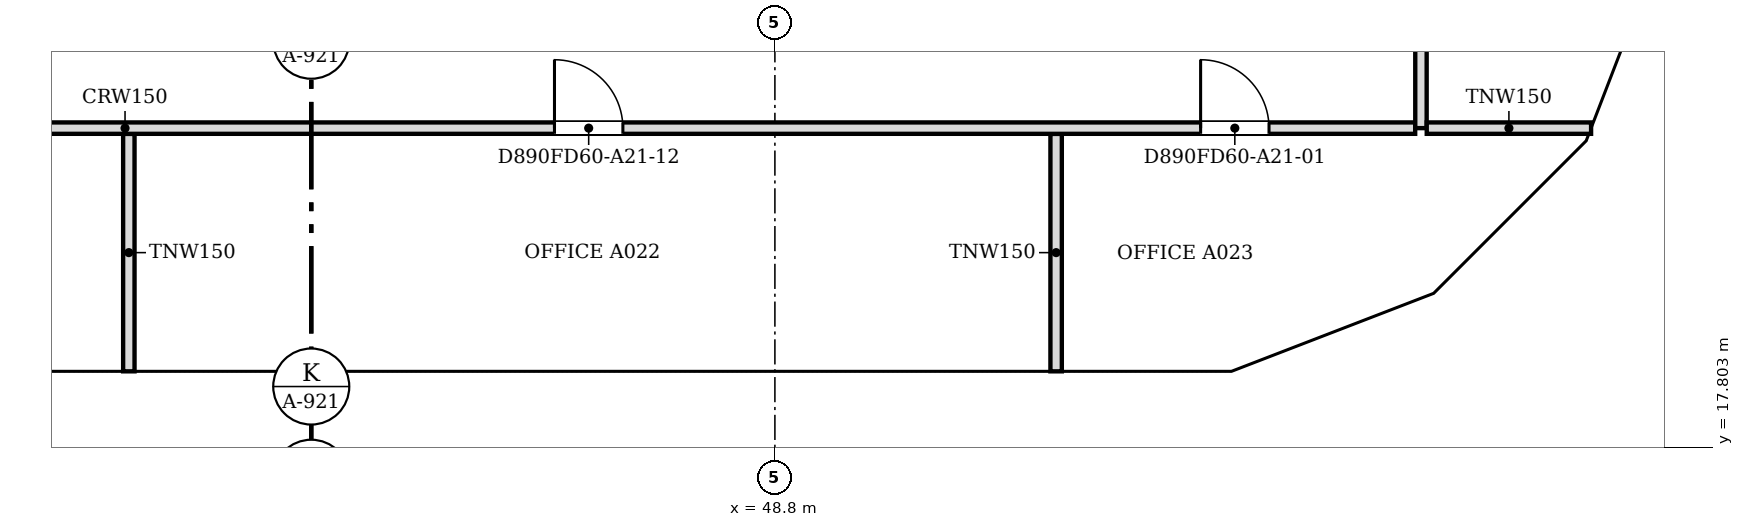
"""IFC4 building model, lengths in metres.
Left out: names, types, materials, properties, quantities, classifications, styles, units other than length and angle.
Written with IfcOpenShell. Run it as: python <this file> out.ifc"""

import sys

from ifc_helpers import new_model, si_unit, direction, frame, frame_2d, origin, place, context, subcontext, project, spatial, polyline, rectangle, outline, extrude, faceted_brep, source, transform, mapped, element, fill, save


model = new_model("IFC4")
c1 = context("Model", 3, precision=1e-05, world=origin(), true_north=direction((0.0, 1.0)))
c2 = subcontext(c1, "Body", "Model", "MODEL_VIEW")
j1 = project(units=[si_unit("LENGTHUNIT", "METRE"), si_unit("PLANEANGLEUNIT", "RADIAN")], contexts=[c1])
p1 = place(None, origin())
s1 = spatial("IfcSite", under=j1, at=p1, CompositionType="ELEMENT")
p2 = place(p1, origin())
s2 = spatial("IfcBuilding", under=s1, at=p2, CompositionType="ELEMENT")
p3 = place(p2, frame((0.0, 0.0, 248.3)))
s3 = spatial("IfcBuildingStorey", under=s2, at=p3, CompositionType="ELEMENT", Elevation=248.3)
m1 = source(origin(), c2, "Body", "Brep", [
    faceted_brep([(3.05, -0.25, 0.0), (6.1, -0.25, 3.8), (6.1, -0.25, 3.8), (3.05, -0.25, 7.6), (0.0, -0.25, 3.8), (0.0, 0.25, 3.8), (3.05, 0.25, 7.6), (6.1, 0.25, 3.8), (6.1, 0.25, 3.8), (3.05, 0.25, 0.0)], [[[0, 1, 2, 3, 4]], [[5, 6, 7, 8, 9]], [[9, 8, 1, 0]], [[7, 6, 3, 2]], [[6, 5, 4, 3]], [[5, 9, 0, 4]], [[1, 8, 7, 2]]]),
])
p4 = place(p3, frame((36.6, 18.55, -3.8), z_axis=(0.0, 0.0, 1.0), x_axis=(1.0, 0.0, 0.0)))
e1 = element("IfcWall", 1, at=p4, inside=s3, PredefinedType="SOLIDWALL", context=c2, shape_type="MappedRepresentation", body=[
    mapped(m1, transform((0.0, 0.0, 0.0), scale=1.0)),
])
m2 = source(origin(), c2, "Body", "SweptSolid", [
    extrude(outline(polyline([(3.05, 0.399), (5.78, 3.8), (3.05, 7.201), (0.321, 3.8), (3.05, 0.399)])), frame((0.0, 0.26, 0.0), z_axis=(0.0, -1.0, 0.0), x_axis=(1.0, 0.0, 0.0)), (0.0, 0.0, 1.0), 0.52),
])
p5 = place(p4, origin())
e2 = element("IfcOpeningElement", 2, at=p5, cuts=e1, PredefinedType="OPENING", context=c2, shape_type="MappedRepresentation", body=[
    mapped(m2, transform((0.0, 0.0, 0.0), scale=1.0)),
])
m3 = source(origin(), c2, "Body", "SweptSolid", [
    extrude(outline(polyline([(3.05, 0.0), (6.1, 3.8), (3.05, 7.6), (0.0, 3.8), (3.05, 0.0)])), frame((0.0, 0.25, 0.0), z_axis=(0.0, -1.0, 0.0), x_axis=(1.0, 0.0, 0.0)), (0.0, 0.0, 1.0), 0.5),
])
p6 = place(p3, frame((42.7, 18.55, -3.8), z_axis=(0.0, 0.0, 1.0), x_axis=(1.0, 0.0, 0.0)))
e3 = element("IfcWall", 3, at=p6, inside=s3, PredefinedType="SOLIDWALL", context=c2, shape_type="MappedRepresentation", body=[
    mapped(m3, transform((0.0, 0.0, 0.0), scale=1.0)),
])
p7 = place(p6, origin())
e4 = element("IfcOpeningElement", 4, at=p7, cuts=e3, PredefinedType="OPENING", context=c2, shape_type="MappedRepresentation", body=[
    mapped(m2, transform((0.0, 0.0, 0.0), scale=1.0)),
])
m4 = source(origin(), c2, "Body", "Brep", [
    faceted_brep([(3.05, -0.25, 0.0), (6.053, -0.25, 3.8), (3.05, -0.25, 7.6), (0.0, -0.25, 3.8), (0.0, 0.25, 3.8), (3.05, 0.25, 7.6), (6.007, 0.25, 3.859), (6.007, 0.25, 3.741), (3.05, 0.25, 0.0), (6.053, 0.0, 3.8)], [[[0, 1, 2, 3]], [[4, 5, 6, 7, 8]], [[8, 7, 9, 1, 0]], [[6, 5, 2, 1, 9]], [[5, 4, 3, 2]], [[4, 8, 0, 3]], [[9, 7, 6]]]),
])
p8 = place(p3, frame((48.8, 18.55, -3.8), z_axis=(0.0, 0.0, 1.0), x_axis=(1.0, 0.0, 0.0)))
e5 = element("IfcWall", 5, at=p8, inside=s3, PredefinedType="SOLIDWALL", context=c2, shape_type="MappedRepresentation", body=[
    mapped(m4, transform((0.0, 0.0, 0.0), scale=1.0)),
])
m5 = source(origin(), c2, "Body", "SweptSolid", [
    extrude(outline(polyline([(3.049, 0.401), (5.735, 3.8), (3.049, 7.199), (0.321, 3.8), (3.049, 0.401)])), frame((0.0, 0.26, 0.0), z_axis=(0.0, -1.0, 0.0), x_axis=(1.0, 0.0, 0.0)), (0.0, 0.0, 1.0), 0.52),
])
p9 = place(p8, origin())
e6 = element("IfcOpeningElement", 6, at=p9, cuts=e5, PredefinedType="OPENING", context=c2, shape_type="MappedRepresentation", body=[
    mapped(m5, transform((0.0, 0.0, 0.0), scale=1.0)),
])
m6 = source(origin(), c2, "Body", "Brep", [
    faceted_brep([(2.95, -0.25, 0.0), (3.003, -0.25, 0.068), (3.003, -0.25, 7.532), (2.95, -0.25, 7.6), (0.0, -0.25, 3.8), (0.047, 0.25, 3.86), (2.898, 0.25, 7.532), (2.898, 0.25, 0.068), (0.047, 0.25, 3.74), (2.95, 0.0, 0.0), (2.95, 0.0, 7.6), (0.0, 0.0, 3.8)], [[[0, 1, 2, 3, 4]], [[5, 6, 7, 8]], [[1, 0, 9]], [[10, 3, 2]], [[6, 5, 11, 4, 3, 10]], [[8, 7, 9, 0, 4, 11]], [[8, 11, 5]], [[1, 9, 7, 6, 10, 2]]]),
])
p10 = place(p3, frame((54.854, 18.55, -3.8), z_axis=(0.0, 0.0, 1.0), x_axis=(0.932997369089, 0.359883188373, 0.0)))
e7 = element("IfcWall", 7, at=p10, inside=s3, PredefinedType="SOLIDWALL", context=c2, shape_type="MappedRepresentation", body=[
    mapped(m6, transform((0.0, 0.0, 0.0), scale=1.0)),
])
m7 = source(origin(), c2, "Body", "SweptSolid", [
    extrude(outline(polyline([(2.75, 6.935), (0.316, 3.8), (2.75, 0.665), (2.75, 6.935)])), frame((0.0, 0.26, 0.0), z_axis=(0.0, -1.0, 0.0), x_axis=(1.0, 0.0, 0.0)), (0.0, 0.0, 1.0), 0.52),
])
p11 = place(p10, origin())
e8 = element("IfcOpeningElement", 8, at=p11, cuts=e7, PredefinedType="OPENING", context=c2, shape_type="MappedRepresentation", body=[
    mapped(m7, transform((0.0, 0.0, 0.0), scale=1.0)),
])
m8 = source(origin(), c2, "Body", "Brep", [
    faceted_brep([(0.053, -0.25, 0.0), (2.997, -0.25, 3.8), (0.053, -0.25, 7.6), (0.0, -0.25, 7.532), (0.0, -0.25, 0.068), (0.106, 0.25, 7.532), (2.944, 0.25, 3.868), (2.944, 0.25, 3.732), (0.106, 0.25, 0.068), (2.997, 0.0, 3.8), (0.053, 0.0, 0.0), (0.053, 0.0, 7.6)], [[[0, 1, 2, 3, 4]], [[5, 6, 7, 8]], [[8, 7, 9, 1, 0, 10]], [[6, 5, 11, 2, 1, 9]], [[3, 2, 11]], [[10, 0, 4]], [[8, 10, 4, 3, 11, 5]], [[9, 7, 6]]]),
])
p12 = place(p3, frame((57.569, 19.574, -3.8), z_axis=(0.0, 0.0, 1.0), x_axis=(0.707106781187, 0.707106781187, 0.0)))
e9 = element("IfcWall", 9, at=p12, inside=s3, PredefinedType="SOLIDWALL", context=c2, shape_type="MappedRepresentation", body=[
    mapped(m8, transform((0.0, 0.0, 0.0), scale=1.0)),
])
m9 = source(origin(), c2, "Body", "SweptSolid", [
    extrude(outline(polyline([(0.253, 0.666), (2.681, 3.8), (0.253, 6.934), (0.253, 0.666)])), frame((0.0, 0.26, 0.0), z_axis=(0.0, -1.0, 0.0), x_axis=(1.0, 0.0, 0.0)), (0.0, 0.0, 1.0), 0.52),
])
p13 = place(p12, origin())
e10 = element("IfcOpeningElement", 10, at=p13, cuts=e9, PredefinedType="OPENING", context=c2, shape_type="MappedRepresentation", body=[
    mapped(m9, transform((0.0, 0.0, 0.0), scale=1.0)),
])
m10 = source(origin(), c2, "Body", "Brep", [
    faceted_brep([(2.95, -0.25, 0.0), (2.997, -0.25, 0.059), (2.997, -0.25, 7.541), (2.95, -0.25, 7.6), (0.0, -0.25, 3.8), (0.053, 0.25, 3.868), (2.904, 0.25, 7.54), (2.904, 0.25, 0.06), (0.053, 0.25, 3.732), (2.95, 0.0, 0.0), (2.95, 0.0, 7.6), (0.0, 0.0, 3.8)], [[[0, 1, 2, 3, 4]], [[5, 6, 7, 8]], [[1, 0, 9]], [[10, 3, 2]], [[6, 5, 11, 4, 3, 10]], [[8, 7, 9, 0, 4, 11]], [[8, 11, 5]], [[1, 9, 7, 6, 10, 2]]]),
])
p14 = place(p3, frame((59.688, 21.694, -3.8), z_axis=(0.0, 0.0, 1.0), x_axis=(0.359972353723, 0.932962970624, 0.0)))
e11 = element("IfcWall", 11, at=p14, inside=s3, PredefinedType="SOLIDWALL", context=c2, shape_type="MappedRepresentation", body=[
    mapped(m10, transform((0.0, 0.0, 0.0), scale=1.0)),
])
p15 = place(p14, origin())
e12 = element("IfcOpeningElement", 12, at=p15, cuts=e11, PredefinedType="OPENING", context=c2, shape_type="MappedRepresentation", body=[
    mapped(m7, transform((0.0, 0.0, 0.0), scale=1.0)),
])
p16 = place(p2, frame((0.0, 0.0, 252.1)))
s4 = spatial("IfcBuildingStorey", under=s2, at=p16, CompositionType="ELEMENT", Elevation=252.1)
m11 = source(origin(), c2, "Body", "Brep", [
    faceted_brep([(3.05, -0.25, 0.0), (6.1, -0.25, 3.8), (6.1, -0.25, 3.8), (3.05, -0.25, 7.6), (0.0, -0.25, 3.8), (0.0, 0.25, 3.8), (3.05, 0.25, 7.6), (6.1, 0.25, 3.8), (6.1, 0.25, 3.8), (3.05, 0.25, 0.0)], [[[0, 1, 2, 3, 4]], [[5, 6, 7, 8, 9]], [[9, 8, 1, 0]], [[7, 6, 3, 2]], [[6, 5, 4, 3]], [[5, 9, 0, 4]], [[1, 8, 7, 2]]]),
])
p17 = place(p16, frame((33.55, 18.55, -3.8), z_axis=(0.0, 0.0, 1.0), x_axis=(1.0, 0.0, 0.0)))
e13 = element("IfcWall", 13, at=p17, inside=s4, PredefinedType="SOLIDWALL", context=c2, shape_type="MappedRepresentation", body=[
    mapped(m11, transform((0.0, 0.0, 0.0), scale=1.0)),
])
m12 = source(origin(), c2, "Body", "SweptSolid", [
    extrude(outline(polyline([(3.05, 0.399), (5.78, 3.8), (3.05, 7.2), (0.321, 3.8), (3.05, 0.399)])), frame((0.0, 0.26, 0.0), z_axis=(0.0, -1.0, 0.0), x_axis=(1.0, 0.0, 0.0)), (0.0, 0.0, 1.0), 0.52),
])
p18 = place(p17, origin())
e14 = element("IfcOpeningElement", 14, at=p18, cuts=e13, PredefinedType="OPENING", context=c2, shape_type="MappedRepresentation", body=[
    mapped(m12, transform((0.0, 0.0, 0.0), scale=1.0)),
])
m13 = source(origin(), c2, "Body", "SweptSolid", [
    extrude(outline(polyline([(3.05, 0.0), (6.1, 3.8), (3.05, 7.6), (0.0, 3.8), (3.05, 0.0)])), frame((0.0, 0.25, 0.0), z_axis=(0.0, -1.0, 0.0), x_axis=(1.0, 0.0, 0.0)), (0.0, 0.0, 1.0), 0.5),
])
p19 = place(p16, frame((39.65, 18.55, -3.8), z_axis=(0.0, 0.0, 1.0), x_axis=(1.0, 0.0, 0.0)))
e15 = element("IfcWall", 15, at=p19, inside=s4, PredefinedType="SOLIDWALL", context=c2, shape_type="MappedRepresentation", body=[
    mapped(m13, transform((0.0, 0.0, 0.0), scale=1.0)),
])
p20 = place(p19, origin())
e16 = element("IfcOpeningElement", 16, at=p20, cuts=e15, PredefinedType="OPENING", context=c2, shape_type="MappedRepresentation", body=[
    mapped(m12, transform((0.0, 0.0, 0.0), scale=1.0)),
])
p21 = place(p16, frame((45.75, 18.55, -3.8), z_axis=(0.0, 0.0, 1.0), x_axis=(1.0, 0.0, 0.0)))
e17 = element("IfcWall", 17, at=p21, inside=s4, PredefinedType="SOLIDWALL", context=c2, shape_type="MappedRepresentation", body=[
    mapped(m13, transform((0.0, 0.0, 0.0), scale=1.0)),
])
p22 = place(p21, origin())
e18 = element("IfcOpeningElement", 18, at=p22, cuts=e17, PredefinedType="OPENING", context=c2, shape_type="MappedRepresentation", body=[
    mapped(m12, transform((0.0, 0.0, 0.0), scale=1.0)),
])
m14 = source(origin(), c2, "Body", "Brep", [
    faceted_brep([(3.003, -0.25, 0.0), (3.05, -0.25, 0.06), (3.05, -0.25, 7.54), (3.003, -0.25, 7.6), (0.0, -0.25, 3.8), (0.0, 0.25, 3.8), (2.957, 0.25, 7.541), (2.957, 0.25, 0.059), (3.003, 0.0, 0.0), (3.003, 0.0, 7.6)], [[[0, 1, 2, 3, 4]], [[5, 6, 7]], [[1, 0, 8]], [[9, 3, 2]], [[6, 5, 4, 3, 9]], [[5, 7, 8, 0, 4]], [[1, 8, 7, 6, 9, 2]]]),
])
p23 = place(p16, frame((51.85, 18.55, -3.8), z_axis=(0.0, 0.0, 1.0), x_axis=(1.0, 0.0, 0.0)))
e19 = element("IfcWall", 19, at=p23, inside=s4, PredefinedType="SOLIDWALL", context=c2, shape_type="MappedRepresentation", body=[
    mapped(m14, transform((0.0, 0.0, 0.0), scale=1.0)),
])
m15 = source(origin(), c2, "Body", "SweptSolid", [
    extrude(outline(polyline([(2.803, 6.944), (0.319, 3.8), (2.803, 0.656), (2.803, 6.944)])), frame((0.0, 0.26, 0.0), z_axis=(0.0, -1.0, 0.0), x_axis=(1.0, 0.0, 0.0)), (0.0, 0.0, 1.0), 0.52),
])
p24 = place(p23, origin())
e20 = element("IfcOpeningElement", 20, at=p24, cuts=e19, PredefinedType="OPENING", context=c2, shape_type="MappedRepresentation", body=[
    mapped(m15, transform((0.0, 0.0, 0.0), scale=1.0)),
])
m16 = source(origin(), c2, "Body", "Brep", [
    faceted_brep([(0.047, -0.25, 0.0), (2.997, -0.25, 3.8), (0.047, -0.25, 7.6), (0.0, -0.25, 7.541), (0.0, -0.25, 0.059), (0.093, 0.25, 7.54), (2.944, 0.25, 3.868), (2.944, 0.25, 3.732), (0.093, 0.25, 0.06), (2.997, 0.0, 3.8), (0.047, 0.0, 0.0), (0.047, 0.0, 7.6)], [[[0, 1, 2, 3, 4]], [[5, 6, 7, 8]], [[8, 7, 9, 1, 0, 10]], [[6, 5, 11, 2, 1, 9]], [[3, 2, 11]], [[10, 0, 4]], [[8, 10, 4, 3, 11, 5]], [[7, 6, 9]]]),
])
p25 = place(p16, frame((54.81, 18.533, -3.8), z_axis=(0.0, 0.0, 1.0), x_axis=(0.932990326376, 0.359901446078, 0.0)))
e21 = element("IfcWall", 21, at=p25, inside=s4, PredefinedType="SOLIDWALL", context=c2, shape_type="MappedRepresentation", body=[
    mapped(m16, transform((0.0, 0.0, 0.0), scale=1.0)),
])
m17 = source(origin(), c2, "Body", "SweptSolid", [
    extrude(outline(polyline([(0.247, 0.665), (2.681, 3.8), (0.247, 6.935), (0.247, 0.665)])), frame((0.0, 0.26, 0.0), z_axis=(0.0, -1.0, 0.0), x_axis=(1.0, 0.0, 0.0)), (0.0, 0.0, 1.0), 0.52),
])
p26 = place(p25, origin())
e22 = element("IfcOpeningElement", 22, at=p26, cuts=e21, PredefinedType="OPENING", context=c2, shape_type="MappedRepresentation", body=[
    mapped(m17, transform((0.0, 0.0, 0.0), scale=1.0)),
])
m18 = source(origin(), c2, "Body", "Brep", [
    faceted_brep([(2.944, -0.25, 0.0), (2.997, -0.25, 0.068), (2.997, -0.25, 7.532), (2.944, -0.25, 7.6), (0.0, -0.25, 3.8), (0.053, 0.25, 3.868), (2.891, 0.25, 7.532), (2.891, 0.25, 0.068), (0.053, 0.25, 3.732), (2.944, 0.0, 0.0), (2.944, 0.0, 7.6), (0.0, 0.0, 3.8)], [[[0, 1, 2, 3, 4]], [[5, 6, 7, 8]], [[1, 0, 9]], [[10, 3, 2]], [[6, 5, 11, 4, 3, 10]], [[8, 7, 9, 0, 4, 11]], [[8, 11, 5]], [[1, 9, 7, 6, 10, 2]]]),
])
p27 = place(p16, frame((57.606, 19.612, -3.8), z_axis=(0.0, 0.0, 1.0), x_axis=(0.707106781187, 0.707106781187, 0.0)))
e23 = element("IfcWall", 23, at=p27, inside=s4, PredefinedType="SOLIDWALL", context=c2, shape_type="MappedRepresentation", body=[
    mapped(m18, transform((0.0, 0.0, 0.0), scale=1.0)),
])
m19 = source(origin(), c2, "Body", "SweptSolid", [
    extrude(outline(polyline([(2.744, 6.934), (0.316, 3.8), (2.744, 0.666), (2.744, 6.934)])), frame((0.0, 0.26, 0.0), z_axis=(0.0, -1.0, 0.0), x_axis=(1.0, 0.0, 0.0)), (0.0, 0.0, 1.0), 0.52),
])
p28 = place(p27, origin())
e24 = element("IfcOpeningElement", 24, at=p28, cuts=e23, PredefinedType="OPENING", context=c2, shape_type="MappedRepresentation", body=[
    mapped(m19, transform((0.0, 0.0, 0.0), scale=1.0)),
])
m20 = source(origin(), c2, "Body", "Brep", [
    faceted_brep([(0.053, -0.25, 0.0), (3.003, -0.25, 3.8), (0.053, -0.25, 7.6), (0.0, -0.25, 7.531), (0.0, -0.25, 0.068), (0.106, 0.25, 7.532), (2.957, 0.25, 3.86), (2.957, 0.25, 3.74), (0.106, 0.25, 0.068), (3.003, 0.0, 3.8), (0.053, 0.0, 0.0), (0.053, 0.0, 7.6)], [[[0, 1, 2, 3, 4]], [[5, 6, 7, 8]], [[8, 7, 9, 1, 0, 10]], [[6, 5, 11, 2, 1, 9]], [[3, 2, 11]], [[10, 0, 4]], [[8, 10, 4, 3, 11, 5]], [[7, 6, 9]]]),
])
p29 = place(p16, frame((59.669, 21.644, -3.8), z_axis=(0.0, 0.0, 1.0), x_axis=(0.35992665181, 0.932980602862, 0.0)))
e25 = element("IfcWall", 25, at=p29, inside=s4, PredefinedType="SOLIDWALL", context=c2, shape_type="MappedRepresentation", body=[
    mapped(m20, transform((0.0, 0.0, 0.0), scale=1.0)),
])
m21 = source(origin(), c2, "Body", "SweptSolid", [
    extrude(outline(polyline([(0.253, 0.665), (2.687, 3.8), (0.253, 6.935), (0.253, 0.665)])), frame((0.0, 0.26, 0.0), z_axis=(0.0, -1.0, 0.0), x_axis=(1.0, 0.0, 0.0)), (0.0, 0.0, 1.0), 0.52),
])
p30 = place(p29, origin())
e26 = element("IfcOpeningElement", 26, at=p30, cuts=e25, PredefinedType="OPENING", context=c2, shape_type="MappedRepresentation", body=[
    mapped(m21, transform((0.0, 0.0, 0.0), scale=1.0)),
])
for number, where, z_axis, x_axis in (
    (27, (40.3, 18.8, 0.0), (0.0, 0.0, 1.0), (0.0, 1.0, 0.0)),
    (28, (52.5, 18.8, 0.0), (0.0, 0.0, 1.0), (0.0, 1.0, 0.0)),
):
    element("IfcWall", number, at=place(p3, frame(where, z_axis=z_axis, x_axis=x_axis)), inside=s3, PredefinedType="PARTITIONING", context=c2, shape_type="SweptSolid", body=[
        extrude(rectangle(XDim=3.124, YDim=0.15, at=frame_2d((1.562, 0.0))), origin(), (0.0, 0.0, 1.0), 3.067),
    ])
p31 = place(p3, frame((57.224, 22.0, 0.0), z_axis=(0.0, 0.0, 1.0), x_axis=(-1.0, 0.0, 0.0)))
e29 = element("IfcWall", 29, at=p31, inside=s3, PredefinedType="PARTITIONING", context=c2, shape_type="SweptSolid", body=[
    extrude(rectangle(XDim=29.124, YDim=0.15, at=frame_2d((14.562, 0.0))), origin(), (0.0, 0.0, 1.0), 3.067),
])
m22 = source(origin(), c2, "Body", "SweptSolid", [
    extrude(rectangle(XDim=0.9, YDim=2.1, at=frame_2d((0.45, 1.05))), frame((0.0, 0.085, 0.0), z_axis=(0.0, -1.0, 0.0), x_axis=(1.0, 0.0, 0.0)), (0.0, 0.0, 1.0), 0.17),
])
p32 = place(p31, frame((1.923, 0.0, 0.0)))
e30 = element("IfcOpeningElement", 30, at=p32, cuts=e29, PredefinedType="OPENING", context=c2, shape_type="MappedRepresentation", body=[
    mapped(m22, transform((0.0, 0.0, 0.0), scale=1.0)),
])
p33 = place(p31, frame((22.624, 0.0, 0.0)))
e31 = element("IfcOpeningElement", 31, at=p33, cuts=e29, PredefinedType="OPENING", context=c2, shape_type="MappedRepresentation", body=[
    mapped(m22, transform((0.0, 0.0, 0.0), scale=1.0)),
])
p34 = place(p31, frame((10.424, 0.0, 0.0)))
e32 = element("IfcOpeningElement", 32, at=p34, cuts=e29, PredefinedType="OPENING", context=c2, shape_type="MappedRepresentation", body=[
    mapped(m22, transform((0.0, 0.0, 0.0), scale=1.0)),
])
p35 = place(p3, frame((57.3, 30.6, 0.0), z_axis=(0.0, 0.0, 1.0), x_axis=(0.0, -1.0, 0.0)))
e33 = element("IfcWall", 33, at=p35, inside=s3, PredefinedType="PARTITIONING", context=c2, shape_type="SweptSolid", body=[
    extrude(rectangle(XDim=8.6, YDim=0.15, at=frame_2d((4.3, 0.0))), origin(), (0.0, 0.0, 1.0), 3.067),
])
p36 = place(p35, frame((3.9, 0.0, 0.0)))
e34 = element("IfcOpeningElement", 34, at=p36, cuts=e33, PredefinedType="OPENING", context=c2, shape_type="MappedRepresentation", body=[
    mapped(m22, transform((0.0, 0.0, 0.0), scale=1.0)),
])
p37 = place(p3, frame((57.376, 22.0, 0.0), z_axis=(0.0, 0.0, 1.0), x_axis=(1.0, 0.0, 0.0)))
e35 = element("IfcWall", 35, at=p37, inside=s3, PredefinedType="PARTITIONING", context=c2, shape_type="SweptSolid", body=[
    extrude(rectangle(XDim=2.162, YDim=0.15, at=frame_2d((1.081, 0.0))), origin(), (0.0, 0.0, 1.0), 3.067),
])
m23 = source(origin(), c2, "Body", "SweptSolid", [
    extrude(rectangle(XDim=0.9, YDim=2.1, at=frame_2d((0.45, 1.05))), frame((0.0, 0.025, 0.0), z_axis=(0.0, -1.0, 0.0), x_axis=(1.0, 0.0, 0.0)), (0.0, 0.0, 1.0), 0.05),
])
p38 = place(p32, origin())
e36 = element("IfcDoor", 36, at=p38, inside=s3, OperationType="SINGLE_SWING_RIGHT", PredefinedType="DOOR", context=c2, shape_type="MappedRepresentation", body=[
    mapped(m23, transform((0.0, 0.0, 0.0), scale=1.0)),
])
fill(e30, e36)
p39 = place(p34, origin())
e37 = element("IfcDoor", 37, at=p39, inside=s3, OperationType="SINGLE_SWING_RIGHT", PredefinedType="DOOR", context=c2, shape_type="MappedRepresentation", body=[
    mapped(m23, transform((0.0, 0.0, 0.0), scale=1.0)),
])
fill(e32, e37)
save(model, sys.argv[1])
